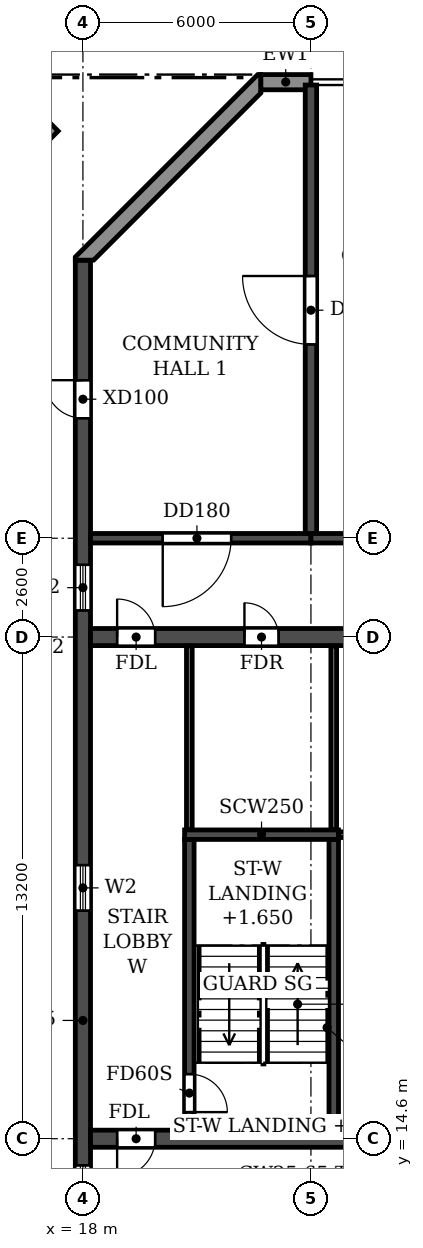
"""IFC4 building model, lengths in metres.
Left out: names, types, materials, properties, quantities, classifications, styles, units other than length and angle.
Written with IfcOpenShell. Run it as: python <this file> out.ifc"""

import sys

from ifc_helpers import new_model, si_unit, direction, frame, frame_2d, origin, place, context, subcontext, project, spatial, polyline, rectangle, outline, extrude, source, transform, mapped, element, fill, save


model = new_model("IFC4")
c1 = context("Model", 3, precision=1e-05, world=origin(), true_north=direction((0.0, 1.0)))
c2 = subcontext(c1, "Body", "Model", "MODEL_VIEW")
j1 = project(units=[si_unit("LENGTHUNIT", "METRE"), si_unit("PLANEANGLEUNIT", "RADIAN")], contexts=[c1])
p1 = place(None, origin())
s1 = spatial("IfcSite", under=j1, at=p1, CompositionType="ELEMENT")
p2 = place(p1, origin())
s2 = spatial("IfcBuilding", under=s1, at=p2, CompositionType="ELEMENT")
p3 = place(p2, frame((0.0, 0.0, 158.7)))
s3 = spatial("IfcBuildingStorey", under=s2, at=p3, CompositionType="ELEMENT", Elevation=158.7)
p4 = place(p3, frame((24.0, 30.525, 0.0), z_axis=(0.0, 0.0, 1.0), x_axis=(0.0, 1.0, 0.0)))
e1 = element("IfcWall", 1, at=p4, inside=s3, PredefinedType="SHEAR", context=c2, shape_type="SweptSolid", body=[
    extrude(rectangle(XDim=11.8, YDim=0.3, at=frame_2d((5.9, 0.0))), origin(), (0.0, 0.0, 1.0), 3.07),
])
p5 = place(p4, frame((4.975, 0.0, 0.0)))
e2 = element("IfcOpeningElement", 2, at=p5, cuts=e1, PredefinedType="OPENING", context=c2, shape_type="SweptSolid", body=[
    extrude(rectangle(XDim=1.8, YDim=2.1, at=frame_2d((0.9, 1.05))), frame((0.0, 0.16, 0.0), z_axis=(0.0, -1.0, 0.0), x_axis=(1.0, 0.0, 0.0)), (0.0, 0.0, 1.0), 0.32),
])
p6 = place(p3, frame((18.0, 4.683, 0.0), z_axis=(0.0, 0.0, 1.0), x_axis=(0.0, 1.0, 0.0)))
e3 = element("IfcWall", 3, at=p6, inside=s3, PredefinedType="SHEAR", context=c2, shape_type="SweptSolid", body=[
    extrude(rectangle(XDim=33.034, YDim=0.4, at=frame_2d((16.517, 0.0))), origin(), (0.0, 0.0, 1.0), 3.07),
])
p7 = place(p6, frame((23.817, 0.0, 0.9)))
e4 = element("IfcOpeningElement", 4, at=p7, cuts=e3, PredefinedType="OPENING", context=c2, shape_type="SweptSolid", body=[
    extrude(rectangle(XDim=1.2, YDim=1.5, at=frame_2d((0.6, 0.75))), frame((0.0, 0.21, 0.0), z_axis=(0.0, -1.0, 0.0), x_axis=(1.0, 0.0, 0.0)), (0.0, 0.0, 1.0), 0.42),
])
p8 = place(p6, frame((8.017, 0.0, 0.9)))
e5 = element("IfcOpeningElement", 5, at=p8, cuts=e3, PredefinedType="OPENING", context=c2, shape_type="SweptSolid", body=[
    extrude(rectangle(XDim=1.2, YDim=1.5, at=frame_2d((0.6, 0.75))), frame((0.0, 0.21, 0.0), z_axis=(0.0, -1.0, 0.0), x_axis=(1.0, 0.0, 0.0)), (0.0, 0.0, 1.0), 0.42),
])
p9 = place(p6, frame((15.917, 0.0, 0.9)))
e6 = element("IfcOpeningElement", 6, at=p9, cuts=e3, PredefinedType="OPENING", context=c2, shape_type="SweptSolid", body=[
    extrude(rectangle(XDim=1.2, YDim=1.5, at=frame_2d((0.6, 0.75))), frame((0.0, 0.21, 0.0), z_axis=(0.0, -1.0, 0.0), x_axis=(1.0, 0.0, 0.0)), (0.0, 0.0, 1.0), 0.42),
])
p10 = place(p6, frame((28.876, 0.0, 0.0)))
e7 = element("IfcOpeningElement", 7, at=p10, cuts=e3, PredefinedType="OPENING", context=c2, shape_type="SweptSolid", body=[
    extrude(rectangle(XDim=1.0, YDim=2.1, at=frame_2d((0.5, 1.05))), frame((0.0, 0.21, 0.0), z_axis=(0.0, -1.0, 0.0), x_axis=(1.0, 0.0, 0.0)), (0.0, 0.0, 1.0), 0.42),
])
p11 = place(p6, frame((3.159, 0.0, 0.0)))
e8 = element("IfcOpeningElement", 8, at=p11, cuts=e3, PredefinedType="OPENING", context=c2, shape_type="SweptSolid", body=[
    extrude(rectangle(XDim=1.0, YDim=2.1, at=frame_2d((0.5, 1.05))), frame((0.0, 0.21, 0.0), z_axis=(0.0, -1.0, 0.0), x_axis=(1.0, 0.0, 0.0)), (0.0, 0.0, 1.0), 0.42),
])
p12 = place(p3, frame((18.2, 30.4, 0.0), z_axis=(0.0, 0.0, 1.0), x_axis=(1.0, 0.0, 0.0)))
e9 = element("IfcWall", 9, at=p12, inside=s3, PredefinedType="SHEAR", context=c2, shape_type="SweptSolid", body=[
    extrude(rectangle(XDim=5.8, YDim=0.25, at=frame_2d((2.9, 0.0))), origin(), (0.0, 0.0, 1.0), 2.47),
])
p13 = place(p12, frame((1.9, 0.0, 0.0)))
e10 = element("IfcOpeningElement", 10, at=p13, cuts=e9, PredefinedType="OPENING", context=c2, shape_type="SweptSolid", body=[
    extrude(rectangle(XDim=1.8, YDim=2.1, at=frame_2d((0.9, 1.05))), frame((0.0, 0.135, 0.0), z_axis=(0.0, -1.0, 0.0), x_axis=(1.0, 0.0, 0.0)), (0.0, 0.0, 1.0), 0.27),
])
p14 = place(p3, frame((24.0, 30.4, 0.0), z_axis=(0.0, 0.0, 1.0), x_axis=(1.0, 0.0, 0.0)))
e11 = element("IfcWall", 11, at=p14, inside=s3, PredefinedType="SHEAR", context=c2, shape_type="SweptSolid", body=[
    extrude(rectangle(XDim=6.0, YDim=0.25, at=frame_2d((3.0, 0.0))), origin(), (0.0, 0.0, 1.0), 2.47),
])
p15 = place(p14, frame((2.1, 0.0, 0.0)))
e12 = element("IfcOpeningElement", 12, at=p15, cuts=e11, PredefinedType="OPENING", context=c2, shape_type="SweptSolid", body=[
    extrude(rectangle(XDim=1.8, YDim=2.1, at=frame_2d((0.9, 1.05))), frame((0.0, 0.135, 0.0), z_axis=(0.0, -1.0, 0.0), x_axis=(1.0, 0.0, 0.0)), (0.0, 0.0, 1.0), 0.27),
])
p16 = place(p3, frame((18.2, 14.6, 0.0), z_axis=(0.0, 0.0, 1.0), x_axis=(1.0, 0.0, 0.0)))
e13 = element("IfcWall", 13, at=p16, inside=s3, PredefinedType="SOLIDWALL", context=c2, shape_type="SweptSolid", body=[
    extrude(rectangle(XDim=65.6, YDim=0.45, at=frame_2d((32.8, 0.0))), origin(), (0.0, 0.0, 1.0), 3.07),
])
p17 = place(p16, frame((0.7, 0.0, 0.0)))
e14 = element("IfcOpeningElement", 14, at=p17, cuts=e13, PredefinedType="OPENING", context=c2, shape_type="SweptSolid", body=[
    extrude(rectangle(XDim=1.0, YDim=2.1, at=frame_2d((0.5, 1.05))), frame((0.0, 0.235, 0.0), z_axis=(0.0, -1.0, 0.0), x_axis=(1.0, 0.0, 0.0)), (0.0, 0.0, 1.0), 0.47),
])
p18 = place(p16, frame((8.65, 0.0, 0.0)))
e15 = element("IfcOpeningElement", 15, at=p18, cuts=e13, PredefinedType="OPENING", context=c2, shape_type="SweptSolid", body=[
    extrude(rectangle(XDim=0.9, YDim=2.1, at=frame_2d((0.45, 1.05))), frame((0.0, 0.235, 0.0), z_axis=(0.0, -1.0, 0.0), x_axis=(1.0, 0.0, 0.0)), (0.0, 0.0, 1.0), 0.47),
])
p19 = place(p16, frame((13.2, 0.0, 0.0)))
e16 = element("IfcOpeningElement", 16, at=p19, cuts=e13, PredefinedType="OPENING", context=c2, shape_type="SweptSolid", body=[
    extrude(rectangle(XDim=1.0, YDim=2.1, at=frame_2d((0.5, 1.05))), frame((0.0, 0.235, 0.0), z_axis=(0.0, -1.0, 0.0), x_axis=(1.0, 0.0, 0.0)), (0.0, 0.0, 1.0), 0.47),
])
p20 = place(p16, frame((27.1, 0.0, 0.0)))
e17 = element("IfcOpeningElement", 17, at=p20, cuts=e13, PredefinedType="OPENING", context=c2, shape_type="SweptSolid", body=[
    extrude(rectangle(XDim=1.0, YDim=2.1, at=frame_2d((0.5, 1.05))), frame((0.0, 0.235, 0.0), z_axis=(0.0, -1.0, 0.0), x_axis=(1.0, 0.0, 0.0)), (0.0, 0.0, 1.0), 0.47),
])
p21 = place(p16, frame((32.3, 0.0, 0.0)))
e18 = element("IfcOpeningElement", 18, at=p21, cuts=e13, PredefinedType="OPENING", context=c2, shape_type="SweptSolid", body=[
    extrude(rectangle(XDim=1.0, YDim=2.1, at=frame_2d((0.5, 1.05))), frame((0.0, 0.235, 0.0), z_axis=(0.0, -1.0, 0.0), x_axis=(1.0, 0.0, 0.0)), (0.0, 0.0, 1.0), 0.47),
])
p22 = place(p16, frame((37.25, 0.0, 0.0)))
e19 = element("IfcOpeningElement", 19, at=p22, cuts=e13, PredefinedType="OPENING", context=c2, shape_type="SweptSolid", body=[
    extrude(rectangle(XDim=1.5, YDim=2.1, at=frame_2d((0.75, 1.05))), frame((0.0, 0.235, 0.0), z_axis=(0.0, -1.0, 0.0), x_axis=(1.0, 0.0, 0.0)), (0.0, 0.0, 1.0), 0.47),
])
p23 = place(p16, frame((51.4, 0.0, 0.0)))
e20 = element("IfcOpeningElement", 20, at=p23, cuts=e13, PredefinedType="OPENING", context=c2, shape_type="SweptSolid", body=[
    extrude(rectangle(XDim=1.0, YDim=2.1, at=frame_2d((0.5, 1.05))), frame((0.0, 0.235, 0.0), z_axis=(0.0, -1.0, 0.0), x_axis=(1.0, 0.0, 0.0)), (0.0, 0.0, 1.0), 0.47),
])
p24 = place(p16, frame((56.05, 0.0, 0.0)))
e21 = element("IfcOpeningElement", 21, at=p24, cuts=e13, PredefinedType="OPENING", context=c2, shape_type="SweptSolid", body=[
    extrude(rectangle(XDim=0.9, YDim=2.1, at=frame_2d((0.45, 1.05))), frame((0.0, 0.235, 0.0), z_axis=(0.0, -1.0, 0.0), x_axis=(1.0, 0.0, 0.0)), (0.0, 0.0, 1.0), 0.47),
])
p25 = place(p16, frame((63.9, 0.0, 0.0)))
e22 = element("IfcOpeningElement", 22, at=p25, cuts=e13, PredefinedType="OPENING", context=c2, shape_type="SweptSolid", body=[
    extrude(rectangle(XDim=1.0, YDim=2.1, at=frame_2d((0.5, 1.05))), frame((0.0, 0.235, 0.0), z_axis=(0.0, -1.0, 0.0), x_axis=(1.0, 0.0, 0.0)), (0.0, 0.0, 1.0), 0.47),
])
p26 = place(p3, frame((18.2, 27.8, 0.0), z_axis=(0.0, 0.0, 1.0), x_axis=(1.0, 0.0, 0.0)))
e23 = element("IfcWall", 23, at=p26, inside=s3, PredefinedType="SOLIDWALL", context=c2, shape_type="SweptSolid", body=[
    extrude(rectangle(XDim=65.6, YDim=0.45, at=frame_2d((32.8, 0.0))), origin(), (0.0, 0.0, 1.0), 3.07),
])
p27 = place(p26, frame((0.7, 0.0, 0.0)))
e24 = element("IfcOpeningElement", 24, at=p27, cuts=e23, PredefinedType="OPENING", context=c2, shape_type="SweptSolid", body=[
    extrude(rectangle(XDim=1.0, YDim=2.1, at=frame_2d((0.5, 1.05))), frame((0.0, 0.235, 0.0), z_axis=(0.0, -1.0, 0.0), x_axis=(1.0, 0.0, 0.0)), (0.0, 0.0, 1.0), 0.47),
])
p28 = place(p26, frame((4.05, 0.0, 0.0)))
e25 = element("IfcOpeningElement", 25, at=p28, cuts=e23, PredefinedType="OPENING", context=c2, shape_type="SweptSolid", body=[
    extrude(rectangle(XDim=0.9, YDim=2.1, at=frame_2d((0.45, 1.05))), frame((0.0, 0.235, 0.0), z_axis=(0.0, -1.0, 0.0), x_axis=(1.0, 0.0, 0.0)), (0.0, 0.0, 1.0), 0.47),
])
p29 = place(p26, frame((8.65, 0.0, 0.0)))
e26 = element("IfcOpeningElement", 26, at=p29, cuts=e23, PredefinedType="OPENING", context=c2, shape_type="SweptSolid", body=[
    extrude(rectangle(XDim=0.9, YDim=2.1, at=frame_2d((0.45, 1.05))), frame((0.0, 0.235, 0.0), z_axis=(0.0, -1.0, 0.0), x_axis=(1.0, 0.0, 0.0)), (0.0, 0.0, 1.0), 0.47),
])
p30 = place(p26, frame((13.25, 0.0, 0.0)))
e27 = element("IfcOpeningElement", 27, at=p30, cuts=e23, PredefinedType="OPENING", context=c2, shape_type="SweptSolid", body=[
    extrude(rectangle(XDim=0.9, YDim=2.1, at=frame_2d((0.45, 1.05))), frame((0.0, 0.235, 0.0), z_axis=(0.0, -1.0, 0.0), x_axis=(1.0, 0.0, 0.0)), (0.0, 0.0, 1.0), 0.47),
])
p31 = place(p26, frame((19.0, 0.0, 0.0)))
e28 = element("IfcOpeningElement", 28, at=p31, cuts=e23, PredefinedType="OPENING", context=c2, shape_type="SweptSolid", body=[
    extrude(rectangle(XDim=1.0, YDim=2.1, at=frame_2d((0.5, 1.05))), frame((0.0, 0.235, 0.0), z_axis=(0.0, -1.0, 0.0), x_axis=(1.0, 0.0, 0.0)), (0.0, 0.0, 1.0), 0.47),
])
p32 = place(p26, frame((24.2, 0.0, 0.0)))
e29 = element("IfcOpeningElement", 29, at=p32, cuts=e23, PredefinedType="OPENING", context=c2, shape_type="SweptSolid", body=[
    extrude(rectangle(XDim=1.0, YDim=2.1, at=frame_2d((0.5, 1.05))), frame((0.0, 0.235, 0.0), z_axis=(0.0, -1.0, 0.0), x_axis=(1.0, 0.0, 0.0)), (0.0, 0.0, 1.0), 0.47),
])
p33 = place(p26, frame((29.4, 0.0, 0.0)))
e30 = element("IfcOpeningElement", 30, at=p33, cuts=e23, PredefinedType="OPENING", context=c2, shape_type="SweptSolid", body=[
    extrude(rectangle(XDim=1.0, YDim=2.1, at=frame_2d((0.5, 1.05))), frame((0.0, 0.235, 0.0), z_axis=(0.0, -1.0, 0.0), x_axis=(1.0, 0.0, 0.0)), (0.0, 0.0, 1.0), 0.47),
])
p34 = place(p26, frame((32.3, 0.0, 0.0)))
e31 = element("IfcOpeningElement", 31, at=p34, cuts=e23, PredefinedType="OPENING", context=c2, shape_type="SweptSolid", body=[
    extrude(rectangle(XDim=1.0, YDim=2.1, at=frame_2d((0.5, 1.05))), frame((0.0, 0.235, 0.0), z_axis=(0.0, -1.0, 0.0), x_axis=(1.0, 0.0, 0.0)), (0.0, 0.0, 1.0), 0.47),
])
p35 = place(p26, frame((35.2, 0.0, 0.0)))
e32 = element("IfcOpeningElement", 32, at=p35, cuts=e23, PredefinedType="OPENING", context=c2, shape_type="SweptSolid", body=[
    extrude(rectangle(XDim=1.0, YDim=2.1, at=frame_2d((0.5, 1.05))), frame((0.0, 0.235, 0.0), z_axis=(0.0, -1.0, 0.0), x_axis=(1.0, 0.0, 0.0)), (0.0, 0.0, 1.0), 0.47),
])
p36 = place(p26, frame((37.8, 0.0, 0.0)))
e33 = element("IfcOpeningElement", 33, at=p36, cuts=e23, PredefinedType="OPENING", context=c2, shape_type="SweptSolid", body=[
    extrude(rectangle(XDim=1.0, YDim=2.1, at=frame_2d((0.5, 1.05))), frame((0.0, 0.235, 0.0), z_axis=(0.0, -1.0, 0.0), x_axis=(1.0, 0.0, 0.0)), (0.0, 0.0, 1.0), 0.47),
])
p37 = place(p26, frame((40.4, 0.0, 0.0)))
e34 = element("IfcOpeningElement", 34, at=p37, cuts=e23, PredefinedType="OPENING", context=c2, shape_type="SweptSolid", body=[
    extrude(rectangle(XDim=1.0, YDim=2.1, at=frame_2d((0.5, 1.05))), frame((0.0, 0.235, 0.0), z_axis=(0.0, -1.0, 0.0), x_axis=(1.0, 0.0, 0.0)), (0.0, 0.0, 1.0), 0.47),
])
p38 = place(p26, frame((43.0, 0.0, 0.0)))
e35 = element("IfcOpeningElement", 35, at=p38, cuts=e23, PredefinedType="OPENING", context=c2, shape_type="SweptSolid", body=[
    extrude(rectangle(XDim=1.0, YDim=2.1, at=frame_2d((0.5, 1.05))), frame((0.0, 0.235, 0.0), z_axis=(0.0, -1.0, 0.0), x_axis=(1.0, 0.0, 0.0)), (0.0, 0.0, 1.0), 0.47),
])
p39 = place(p26, frame((46.9, 0.0, 0.0)))
e36 = element("IfcOpeningElement", 36, at=p39, cuts=e23, PredefinedType="OPENING", context=c2, shape_type="SweptSolid", body=[
    extrude(rectangle(XDim=1.0, YDim=2.1, at=frame_2d((0.5, 1.05))), frame((0.0, 0.235, 0.0), z_axis=(0.0, -1.0, 0.0), x_axis=(1.0, 0.0, 0.0)), (0.0, 0.0, 1.0), 0.47),
])
p40 = place(p26, frame((51.45, 0.0, 0.0)))
e37 = element("IfcOpeningElement", 37, at=p40, cuts=e23, PredefinedType="OPENING", context=c2, shape_type="SweptSolid", body=[
    extrude(rectangle(XDim=0.9, YDim=2.1, at=frame_2d((0.45, 1.05))), frame((0.0, 0.235, 0.0), z_axis=(0.0, -1.0, 0.0), x_axis=(1.0, 0.0, 0.0)), (0.0, 0.0, 1.0), 0.47),
])
p41 = place(p26, frame((56.05, 0.0, 0.0)))
e38 = element("IfcOpeningElement", 38, at=p41, cuts=e23, PredefinedType="OPENING", context=c2, shape_type="SweptSolid", body=[
    extrude(rectangle(XDim=0.9, YDim=2.1, at=frame_2d((0.45, 1.05))), frame((0.0, 0.235, 0.0), z_axis=(0.0, -1.0, 0.0), x_axis=(1.0, 0.0, 0.0)), (0.0, 0.0, 1.0), 0.47),
])
p42 = place(p26, frame((60.65, 0.0, 0.0)))
e39 = element("IfcOpeningElement", 39, at=p42, cuts=e23, PredefinedType="OPENING", context=c2, shape_type="SweptSolid", body=[
    extrude(rectangle(XDim=0.9, YDim=2.1, at=frame_2d((0.45, 1.05))), frame((0.0, 0.235, 0.0), z_axis=(0.0, -1.0, 0.0), x_axis=(1.0, 0.0, 0.0)), (0.0, 0.0, 1.0), 0.47),
])
p43 = place(p26, frame((63.9, 0.0, 0.0)))
e40 = element("IfcOpeningElement", 40, at=p43, cuts=e23, PredefinedType="OPENING", context=c2, shape_type="SweptSolid", body=[
    extrude(rectangle(XDim=1.0, YDim=2.1, at=frame_2d((0.5, 1.05))), frame((0.0, 0.235, 0.0), z_axis=(0.0, -1.0, 0.0), x_axis=(1.0, 0.0, 0.0)), (0.0, 0.0, 1.0), 0.47),
])
p44 = place(p3, frame((20.8, 14.825, 0.0), z_axis=(0.0, 0.0, 1.0), x_axis=(0.0, 1.0, 0.0)))
e41 = element("IfcWall", 41, at=p44, inside=s3, PredefinedType="SOLIDWALL", context=c2, shape_type="SweptSolid", body=[
    extrude(rectangle(XDim=7.65, YDim=0.25, at=frame_2d((3.825, 0.0))), origin(), (0.0, 0.0, 1.0), 3.07),
])
p45 = place(p44, frame((0.475, 0.0, 0.0)))
e42 = element("IfcOpeningElement", 42, at=p45, cuts=e41, PredefinedType="OPENING", context=c2, shape_type="SweptSolid", body=[
    extrude(rectangle(XDim=1.0, YDim=2.1, at=frame_2d((0.5, 1.05))), frame((0.0, 0.135, 0.0), z_axis=(0.0, -1.0, 0.0), x_axis=(1.0, 0.0, 0.0)), (0.0, 0.0, 1.0), 0.27),
])
p46 = place(p3, frame((24.6, 14.825, 0.0), z_axis=(0.0, 0.0, 1.0), x_axis=(0.0, 1.0, 0.0)))
e43 = element("IfcWall", 43, at=p46, inside=s3, PredefinedType="SOLIDWALL", context=c2, shape_type="SweptSolid", body=[
    extrude(rectangle(XDim=7.65, YDim=0.25, at=frame_2d((3.825, 0.0))), origin(), (0.0, 0.0, 1.0), 3.07),
])
p47 = place(p3, frame((20.675, 22.6, 0.0), z_axis=(0.0, 0.0, 1.0), x_axis=(1.0, 0.0, 0.0)))
e44 = element("IfcWall", 44, at=p47, inside=s3, PredefinedType="SOLIDWALL", context=c2, shape_type="SweptSolid", body=[
    extrude(rectangle(XDim=4.05, YDim=0.25, at=frame_2d((2.025, 0.0))), origin(), (0.0, 0.0, 1.0), 3.07),
])
p48 = place(p3, frame((24.0, 42.4, 0.0), z_axis=(0.0, 0.0, 1.0), x_axis=(-1.0, 0.0, 0.0)))
e45 = element("IfcWall", 45, at=p48, inside=s3, PredefinedType="STANDARD", context=c2, shape_type="SweptSolid", body=[
    extrude(rectangle(XDim=1.317, YDim=0.4, at=frame_2d((0.659, 0.0))), origin(), (0.0, 0.0, 1.0), 3.07),
])
p49 = place(p3, origin())
e46 = element("IfcWall", 46, at=p49, inside=s3, PredefinedType="STANDARD", context=c2, shape_type="SweptSolid", body=[
    extrude(outline(polyline([(22.683, 42.6), (22.6, 42.6), (17.8, 37.8), (17.8, 37.717), (18.283, 37.717), (22.683, 42.117), (22.683, 42.6)])), origin(), (0.0, 0.0, 1.0), 3.07),
])
m1 = source(origin(), c2, "Body", "SweptSolid", [
    extrude(outline(polyline([(0.0, 0.0), (0.848, -0.848), (3.394, 1.697), (2.545, 2.546), (0.0, 0.0)])), origin(), (0.0, 0.0, 1.0), 0.6),
])
p50 = place(p3, frame((13.954, 39.417, 0.0)))
e47 = element("IfcWall", 47, at=p50, inside=s3, PredefinedType="USERDEFINED", context=c2, shape_type="MappedRepresentation", body=[
    mapped(m1, transform((0.0, 0.0, 0.0))),
])
p51 = place(p3, frame((24.735, 22.6, 0.0), z_axis=(0.0, 0.0, 1.0), x_axis=(1.0, 0.0, 0.0)))
e48 = element("IfcWall", 48, at=p51, inside=s3, PredefinedType="PARTITIONING", context=c2, shape_type="SweptSolid", body=[
    extrude(rectangle(XDim=5.13, YDim=0.15, at=frame_2d((2.565, 0.0))), origin(), (0.0, 0.0, 1.0), 3.07),
])
for number, where, z_axis, x_axis in (
    (49, (20.8, 22.735, 0.0), (0.0, 0.0, 1.0), (0.0, 1.0, 0.0)),
    (50, (24.6, 22.735, 0.0), (0.0, 0.0, 1.0), (0.0, 1.0, 0.0)),
):
    element("IfcWall", number, at=place(p3, frame(where, z_axis=z_axis, x_axis=x_axis)), inside=s3, PredefinedType="PARTITIONING", context=c2, shape_type="SweptSolid", body=[
        extrude(rectangle(XDim=4.83, YDim=0.15, at=frame_2d((2.415, 0.0))), origin(), (0.0, 0.0, 1.0), 3.07),
    ])
p52 = place(p7, origin())
e51 = element("IfcWindow", 51, at=p52, inside=s3, PartitioningType="SINGLE_PANEL", PredefinedType="WINDOW", context=c2, shape_type="SweptSolid", body=[
    extrude(rectangle(XDim=1.2, YDim=1.5, at=frame_2d((0.6, 0.75))), frame((0.0, 0.03, 0.0), z_axis=(0.0, -1.0, 0.0), x_axis=(1.0, 0.0, 0.0)), (0.0, 0.0, 1.0), 0.06),
])
fill(e4, e51)
p53 = place(p8, origin())
e52 = element("IfcWindow", 52, at=p53, inside=s3, PartitioningType="SINGLE_PANEL", PredefinedType="WINDOW", context=c2, shape_type="SweptSolid", body=[
    extrude(rectangle(XDim=1.2, YDim=1.5, at=frame_2d((0.6, 0.75))), frame((0.0, 0.03, 0.0), z_axis=(0.0, -1.0, 0.0), x_axis=(1.0, 0.0, 0.0)), (0.0, 0.0, 1.0), 0.06),
])
fill(e5, e52)
p54 = place(p9, origin())
e53 = element("IfcWindow", 53, at=p54, inside=s3, PartitioningType="SINGLE_PANEL", PredefinedType="WINDOW", context=c2, shape_type="SweptSolid", body=[
    extrude(rectangle(XDim=1.2, YDim=1.5, at=frame_2d((0.6, 0.75))), frame((0.0, 0.03, 0.0), z_axis=(0.0, -1.0, 0.0), x_axis=(1.0, 0.0, 0.0)), (0.0, 0.0, 1.0), 0.06),
])
fill(e6, e53)
p55 = place(p27, origin())
e54 = element("IfcDoor", 54, at=p55, inside=s3, OperationType="SINGLE_SWING_LEFT", PredefinedType="DOOR", context=c2, shape_type="SweptSolid", body=[
    extrude(rectangle(XDim=1.0, YDim=2.1, at=frame_2d((0.5, 1.05))), frame((0.0, 0.025, 0.0), z_axis=(0.0, -1.0, 0.0), x_axis=(1.0, 0.0, 0.0)), (0.0, 0.0, 1.0), 0.05),
])
fill(e24, e54)
p56 = place(p13, frame((1.8, 0.0, 0.0), z_axis=(0.0, 0.0, 1.0), x_axis=(-1.0, 0.0, 0.0)))
e55 = element("IfcDoor", 55, at=p56, inside=s3, OperationType="DOUBLE_DOOR_SINGLE_SWING", PredefinedType="DOOR", context=c2, shape_type="SweptSolid", body=[
    extrude(rectangle(XDim=1.8, YDim=2.1, at=frame_2d((0.9, 1.05))), frame((0.0, 0.025, 0.0), z_axis=(0.0, -1.0, 0.0), x_axis=(1.0, 0.0, 0.0)), (0.0, 0.0, 1.0), 0.05),
])
fill(e10, e55)
p57 = place(p28, origin())
e56 = element("IfcDoor", 56, at=p57, inside=s3, OperationType="SINGLE_SWING_LEFT", PredefinedType="DOOR", context=c2, shape_type="SweptSolid", body=[
    extrude(rectangle(XDim=0.9, YDim=2.1, at=frame_2d((0.45, 1.05))), frame((0.0, 0.025, 0.0), z_axis=(0.0, -1.0, 0.0), x_axis=(1.0, 0.0, 0.0)), (0.0, 0.0, 1.0), 0.05),
])
fill(e25, e56)
p58 = place(p17, frame((1.0, 0.0, 0.0), z_axis=(0.0, 0.0, 1.0), x_axis=(-1.0, 0.0, 0.0)))
e57 = element("IfcDoor", 57, at=p58, inside=s3, OperationType="SINGLE_SWING_RIGHT", PredefinedType="DOOR", context=c2, shape_type="SweptSolid", body=[
    extrude(rectangle(XDim=1.0, YDim=2.1, at=frame_2d((0.5, 1.05))), frame((0.0, 0.025, 0.0), z_axis=(0.0, -1.0, 0.0), x_axis=(1.0, 0.0, 0.0)), (0.0, 0.0, 1.0), 0.05),
])
fill(e14, e57)
p59 = place(p10, origin())
e58 = element("IfcDoor", 58, at=p59, inside=s3, OperationType="SINGLE_SWING_RIGHT", PredefinedType="DOOR", context=c2, shape_type="SweptSolid", body=[
    extrude(rectangle(XDim=1.0, YDim=2.1, at=frame_2d((0.5, 1.05))), frame((0.0, 0.025, 0.0), z_axis=(0.0, -1.0, 0.0), x_axis=(1.0, 0.0, 0.0)), (0.0, 0.0, 1.0), 0.05),
])
fill(e7, e58)
p60 = place(p5, origin())
e59 = element("IfcDoor", 59, at=p60, inside=s3, OperationType="DOUBLE_DOOR_SINGLE_SWING", PredefinedType="DOOR", context=c2, shape_type="SweptSolid", body=[
    extrude(rectangle(XDim=1.8, YDim=2.1, at=frame_2d((0.9, 1.05))), frame((0.0, 0.025, 0.0), z_axis=(0.0, -1.0, 0.0), x_axis=(1.0, 0.0, 0.0)), (0.0, 0.0, 1.0), 0.05),
])
fill(e2, e59)
p61 = place(p45, frame((1.0, 0.0, 0.0), z_axis=(0.0, 0.0, 1.0), x_axis=(-1.0, 0.0, 0.0)))
e60 = element("IfcDoor", 60, at=p61, inside=s3, OperationType="SINGLE_SWING_RIGHT", PredefinedType="DOOR", context=c2, shape_type="SweptSolid", body=[
    extrude(rectangle(XDim=1.0, YDim=2.1, at=frame_2d((0.5, 1.05))), frame((0.0, 0.025, 0.0), z_axis=(0.0, -1.0, 0.0), x_axis=(1.0, 0.0, 0.0)), (0.0, 0.0, 1.0), 0.05),
])
fill(e42, e60)
save(model, sys.argv[1])
